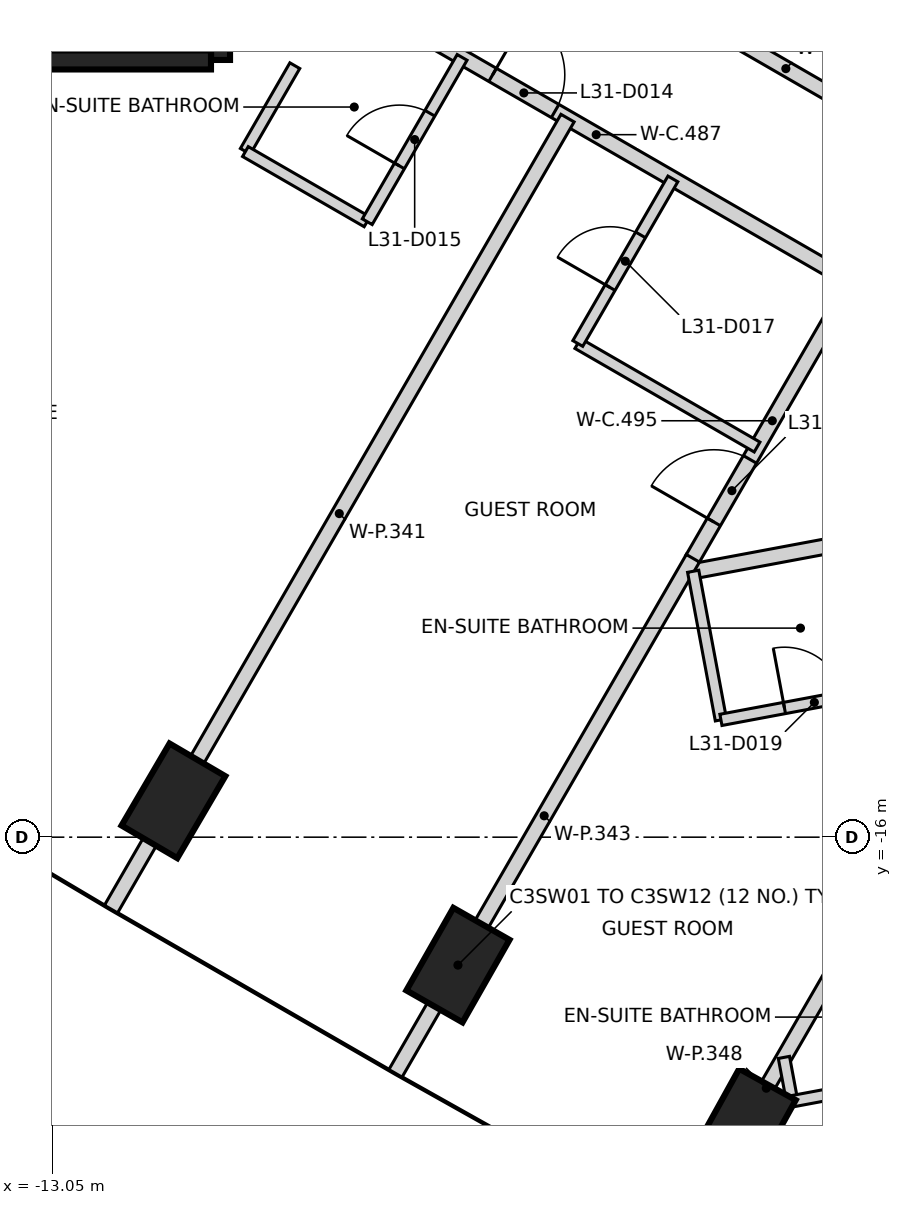
"""IFC4 building model, lengths in metres.
Left out: names, types, materials, properties, quantities, classifications, styles, units other than length and angle.
Written with IfcOpenShell. Run it as: python <this file> out.ifc"""

import sys

from ifc_helpers import new_model, si_unit, direction, frame, frame_2d, origin, origin_2d, place, context, subcontext, project, spatial, rectangle, extrude, element, fill, save


model = new_model("IFC4")
c1 = context("Model", 3, precision=1e-05, world=origin(), true_north=direction((0.0, 1.0)))
c2 = subcontext(c1, "Body", "Model", "MODEL_VIEW")
j1 = project(units=[si_unit("LENGTHUNIT", "METRE"), si_unit("PLANEANGLEUNIT", "RADIAN")], contexts=[c1])
p1 = place(None, origin())
s1 = spatial("IfcSite", under=j1, at=p1, CompositionType="ELEMENT")
p2 = place(p1, origin())
s2 = spatial("IfcBuilding", under=s1, at=p2, CompositionType="ELEMENT")
p3 = place(p2, frame((0.0, 0.0, 128.8)))
s3 = spatial("IfcBuildingStorey", under=s2, at=p3, CompositionType="ELEMENT", Elevation=128.8)
for number, where, z_axis, x_axis in (
    (1, (-11.457, -15.522, -0.4), (0.0, 0.0, 1.0), (0.505, 0.863, 0.0)),
    (2, (-7.714, -17.683, -0.4), (0.0, 0.0, 1.0), (0.495, 0.869, 0.0)),
    (3, (-3.945, -19.8, -0.4), (0.0, 0.0, 1.0), (0.485, 0.875, 0.0)),
):
    element("IfcColumn", number, at=place(p3, frame(where, z_axis=z_axis, x_axis=x_axis)), inside=s3, PredefinedType="COLUMN", context=c2, shape_type="SweptSolid", body=[
        extrude(rectangle(XDim=1.25, YDim=0.85, at=origin_2d()), origin(), (0.0, 0.0, 1.0), 3.6),
    ])
p4 = place(p3, frame((-10.837, 5.775, 0.0), z_axis=(0.0, 0.0, 1.0), x_axis=(0.0, -1.0, 0.0)))
e4 = element("IfcWall", 4, at=p4, inside=s3, PredefinedType="SHEAR", context=c2, shape_type="SweptSolid", body=[
    extrude(rectangle(XDim=11.55, YDim=0.25, at=frame_2d((5.775, 0.0))), origin(), (0.0, 0.0, 1.0), 3.2),
])
p5 = place(p4, frame((10.025, 0.0, 0.0)))
e5 = element("IfcOpeningElement", 5, at=p5, cuts=e4, PredefinedType="OPENING", context=c2, shape_type="SweptSolid", body=[
    extrude(rectangle(XDim=1.2, YDim=2.1, at=frame_2d((0.6, 1.05))), frame((0.0, 0.135, 0.0), z_axis=(0.0, -1.0, 0.0), x_axis=(1.0, 0.0, 0.0)), (0.0, 0.0, 1.0), 0.27),
])
p6 = place(p4, frame((8.725, 0.0, 0.0)))
e6 = element("IfcOpeningElement", 6, at=p6, cuts=e4, PredefinedType="OPENING", context=c2, shape_type="SweptSolid", body=[
    extrude(rectangle(XDim=1.2, YDim=2.1, at=frame_2d((0.6, 1.05))), frame((0.0, 0.135, 0.0), z_axis=(0.0, -1.0, 0.0), x_axis=(1.0, 0.0, 0.0)), (0.0, 0.0, 1.0), 0.27),
])
p7 = place(p3, frame((-10.963, -5.775, 0.0), z_axis=(0.0, 0.0, 1.0), x_axis=(-1.0, 0.0, 0.0)))
e7 = element("IfcWall", 7, at=p7, inside=s3, PredefinedType="SHEAR", context=c2, shape_type="SweptSolid", body=[
    extrude(rectangle(XDim=5.225, YDim=0.25, at=frame_2d((2.612, 0.0))), origin(), (0.0, 0.0, 1.0), 3.2),
])
p8 = place(p3, frame((-9.262, -4.814, 0.0), z_axis=(0.0, 0.0, 1.0), x_axis=(0.866109782156, -0.499853823887, 0.0)))
e8 = element("IfcWall", 8, at=p8, inside=s3, PredefinedType="PARTITIONING", context=c2, shape_type="SweptSolid", body=[
    extrude(rectangle(XDim=7.776, YDim=0.2, at=frame_2d((3.888, 0.0))), origin(), (0.0, 0.0, 1.0), 3.2),
])
p9 = place(p8, frame((2.314, 0.0, 0.0)))
e9 = element("IfcOpeningElement", 9, at=p9, cuts=e8, PredefinedType="OPENING", context=c2, shape_type="SweptSolid", body=[
    extrude(rectangle(XDim=0.95, YDim=2.1, at=frame_2d((0.475, 1.05))), frame((0.0, 0.11, 0.0), z_axis=(0.0, -1.0, 0.0), x_axis=(1.0, 0.0, 0.0)), (0.0, 0.0, 1.0), 0.22),
])
p10 = place(p3, frame((-8.612, -2.88, 0.0), z_axis=(0.0, 0.0, 1.0), x_axis=(0.866035279512, -0.499982894348, 0.0)))
e10 = element("IfcWall", 10, at=p10, inside=s3, PredefinedType="PARTITIONING", context=c2, shape_type="SweptSolid", body=[
    extrude(rectangle(XDim=12.037, YDim=0.2, at=frame_2d((6.018, 0.0))), origin(), (0.0, 0.0, 1.0), 3.2),
])
p11 = place(p10, frame((1.484, 0.0, 0.0)))
e11 = element("IfcOpeningElement", 11, at=p11, cuts=e10, PredefinedType="OPENING", context=c2, shape_type="SweptSolid", body=[
    extrude(rectangle(XDim=0.9, YDim=2.1, at=frame_2d((0.45, 1.05))), frame((0.0, 0.11, 0.0), z_axis=(0.0, -1.0, 0.0), x_axis=(1.0, 0.0, 0.0)), (0.0, 0.0, 1.0), 0.22),
])
p12 = place(p10, frame((7.491, 0.0, 0.0)))
e12 = element("IfcOpeningElement", 12, at=p12, cuts=e10, PredefinedType="OPENING", context=c2, shape_type="SweptSolid", body=[
    extrude(rectangle(XDim=0.9, YDim=2.1, at=frame_2d((0.45, 1.05))), frame((0.0, 0.11, 0.0), z_axis=(0.0, -1.0, 0.0), x_axis=(1.0, 0.0, 0.0)), (0.0, 0.0, 1.0), 0.22),
])
p13 = place(p3, frame((-4.629, -12.341, 0.0), z_axis=(0.0, 0.0, 1.0), x_axis=(0.500069467685, 0.865985292883, 0.0)))
e13 = element("IfcWall", 13, at=p13, inside=s3, PredefinedType="PARTITIONING", context=c2, shape_type="SweptSolid", body=[
    extrude(rectangle(XDim=4.202, YDim=0.2, at=frame_2d((2.101, 0.0))), origin(), (0.0, 0.0, 1.0), 3.2),
])
p14 = place(p13, frame((0.564, 0.0, 0.0)))
e14 = element("IfcOpeningElement", 14, at=p14, cuts=e13, PredefinedType="OPENING", context=c2, shape_type="SweptSolid", body=[
    extrude(rectangle(XDim=0.95, YDim=2.1, at=frame_2d((0.475, 1.05))), frame((0.0, 0.11, 0.0), z_axis=(0.0, -1.0, 0.0), x_axis=(1.0, 0.0, 0.0)), (0.0, 0.0, 1.0), 0.22),
])
p15 = place(p3, frame((-4.6, -12.498, 0.0), z_axis=(0.0, 0.0, 1.0), x_axis=(0.982950102255, 0.183872500602, 0.0)))
e15 = element("IfcWall", 15, at=p15, inside=s3, PredefinedType="PARTITIONING", context=c2, shape_type="SweptSolid", body=[
    extrude(rectangle(XDim=2.48, YDim=0.2, at=frame_2d((1.24, 0.0))), origin(), (0.0, 0.0, 1.0), 3.2),
])
p16 = place(p3, frame((-12.278, -16.946, 0.0), z_axis=(0.0, 0.0, 1.0), x_axis=(0.499887212932, 0.866090511637, 0.0)))
e16 = element("IfcWall", 16, at=p16, inside=s3, PredefinedType="PARTITIONING", context=c2, shape_type="SweptSolid", body=[
    extrude(rectangle(XDim=12.015, YDim=0.2, at=frame_2d((6.007, 0.0))), origin(), (0.0, 0.0, 1.0), 3.2),
])
p17 = place(p3, frame((-8.535, -19.107, 0.0), z_axis=(0.0, 0.0, 1.0), x_axis=(0.500028565219, 0.866008911019, 0.0)))
e17 = element("IfcWall", 17, at=p17, inside=s3, PredefinedType="PARTITIONING", context=c2, shape_type="SweptSolid", body=[
    extrude(rectangle(XDim=7.824, YDim=0.2, at=frame_2d((3.912, 0.0))), origin(), (0.0, 0.0, 1.0), 3.2),
])
p18 = place(p3, frame((-8.0, -0.924, 0.0), z_axis=(0.0, 0.0, 1.0), x_axis=(0.86604129137, -0.499972480886, 0.0)))
e18 = element("IfcWall", 18, at=p18, inside=s3, PredefinedType="PARTITIONING", context=c2, shape_type="SweptSolid", body=[
    extrude(rectangle(XDim=12.932, YDim=0.2, at=frame_2d((6.466, 0.0))), origin(), (0.0, 0.0, 1.0), 2.3),
])
p19 = place(p3, frame((-4.767, -21.223, 0.0), z_axis=(0.0, 0.0, 1.0), x_axis=(0.500305100915, 0.865849182017, 0.0)))
e19 = element("IfcWall", 19, at=p19, inside=s3, PredefinedType="PARTITIONING", context=c2, shape_type="SweptSolid", body=[
    extrude(rectangle(XDim=4.437, YDim=0.2, at=frame_2d((2.218, 0.0))), origin(), (0.0, 0.0, 1.0), 3.2),
])
p20 = place(p3, frame((-10.511, -6.977, 0.0), z_axis=(0.0, 0.0, 1.0), x_axis=(0.500274472704, 0.865866878891, 0.0)))
e20 = element("IfcWall", 20, at=p20, inside=s3, PredefinedType="PARTITIONING", context=c2, shape_type="SweptSolid", body=[
    extrude(rectangle(XDim=1.302, YDim=0.15, at=frame_2d((0.651, 0.0))), origin(), (0.0, 0.0, 1.0), 3.2),
])
p21 = place(p3, frame((-10.51, -6.98, 0.0), z_axis=(0.0, 0.0, 1.0), x_axis=(0.865965533559, -0.500103683937, 0.0)))
e21 = element("IfcWall", 21, at=p21, inside=s3, PredefinedType="PARTITIONING", context=c2, shape_type="SweptSolid", body=[
    extrude(rectangle(XDim=1.848, YDim=0.15, at=frame_2d((0.924, 0.0))), origin(), (0.0, 0.0, 1.0), 3.2),
])
p22 = place(p3, frame((-8.907, -7.903, 0.0), z_axis=(0.0, 0.0, 1.0), x_axis=(0.499925626596, 0.866068339032, 0.0)))
e22 = element("IfcWall", 22, at=p22, inside=s3, PredefinedType="PARTITIONING", context=c2, shape_type="SweptSolid", body=[
    extrude(rectangle(XDim=2.497, YDim=0.15, at=frame_2d((1.248, 0.0))), origin(), (0.0, 0.0, 1.0), 3.2),
])
p23 = place(p22, frame((0.848, 0.0, 0.0)))
e23 = element("IfcOpeningElement", 23, at=p23, cuts=e22, PredefinedType="OPENING", context=c2, shape_type="SweptSolid", body=[
    extrude(rectangle(XDim=0.8, YDim=2.1, at=frame_2d((0.4, 1.05))), frame((0.0, 0.085, 0.0), z_axis=(0.0, -1.0, 0.0), x_axis=(1.0, 0.0, 0.0)), (0.0, 0.0, 1.0), 0.17),
])
p24 = place(p3, frame((-6.137, -9.505, 0.0), z_axis=(0.0, 0.0, 1.0), x_axis=(0.866000497904, -0.50004313577, 0.0)))
e24 = element("IfcWall", 24, at=p24, inside=s3, PredefinedType="PARTITIONING", context=c2, shape_type="SweptSolid", body=[
    extrude(rectangle(XDim=2.724, YDim=0.15, at=frame_2d((1.362, 0.0))), origin(), (0.0, 0.0, 1.0), 3.2),
])
p25 = place(p3, frame((-6.137, -9.505, 0.0), z_axis=(0.0, 0.0, 1.0), x_axis=(0.500339416332, 0.86582935297, 0.0)))
e25 = element("IfcWall", 25, at=p25, inside=s3, PredefinedType="PARTITIONING", context=c2, shape_type="SweptSolid", body=[
    extrude(rectangle(XDim=2.5, YDim=0.15, at=frame_2d((1.25, 0.0))), origin(), (0.0, 0.0, 1.0), 3.2),
])
p26 = place(p25, frame((0.85, 0.0, 0.0)))
e26 = element("IfcOpeningElement", 26, at=p26, cuts=e25, PredefinedType="OPENING", context=c2, shape_type="SweptSolid", body=[
    extrude(rectangle(XDim=0.8, YDim=2.1, at=frame_2d((0.4, 1.05))), frame((0.0, 0.085, 0.0), z_axis=(0.0, -1.0, 0.0), x_axis=(1.0, 0.0, 0.0)), (0.0, 0.0, 1.0), 0.17),
])
p27 = place(p3, frame((-4.619, -12.502, 0.0), z_axis=(0.0, 0.0, 1.0), x_axis=(0.183517674038, -0.983016410502, 0.0)))
e27 = element("IfcWall", 27, at=p27, inside=s3, PredefinedType="PARTITIONING", context=c2, shape_type="SweptSolid", body=[
    extrude(rectangle(XDim=1.989, YDim=0.15, at=frame_2d((0.994, 0.0))), origin(), (0.0, 0.0, 1.0), 3.2),
])
p28 = place(p3, frame((-4.254, -14.457, 0.0), z_axis=(0.0, 0.0, 1.0), x_axis=(0.98293843799, 0.183934844773, 0.0)))
e28 = element("IfcWall", 28, at=p28, inside=s3, PredefinedType="PARTITIONING", context=c2, shape_type="SweptSolid", body=[
    extrude(rectangle(XDim=2.501, YDim=0.15, at=frame_2d((1.25, 0.0))), origin(), (0.0, 0.0, 1.0), 3.2),
])
p29 = place(p28, frame((0.85, 0.0, 0.0)))
e29 = element("IfcOpeningElement", 29, at=p29, cuts=e28, PredefinedType="OPENING", context=c2, shape_type="SweptSolid", body=[
    extrude(rectangle(XDim=0.8, YDim=2.1, at=frame_2d((0.4, 1.05))), frame((0.0, 0.085, 0.0), z_axis=(0.0, -1.0, 0.0), x_axis=(1.0, 0.0, 0.0)), (0.0, 0.0, 1.0), 0.17),
])
p30 = place(p3, frame((-3.425, -18.897, 0.0), z_axis=(0.0, 0.0, 1.0), x_axis=(0.183861553242, -0.982952150025, 0.0)))
e30 = element("IfcWall", 30, at=p30, inside=s3, PredefinedType="PARTITIONING", context=c2, shape_type="SweptSolid", body=[
    extrude(rectangle(XDim=0.587, YDim=0.15, at=frame_2d((0.293, 0.0))), origin(), (0.0, 0.0, 1.0), 3.2),
])
p31 = place(p3, frame((-3.315, -19.474, 0.0), z_axis=(0.0, 0.0, 1.0), x_axis=(0.982978173855, 0.183722371326, 0.0)))
e31 = element("IfcWall", 31, at=p31, inside=s3, PredefinedType="PARTITIONING", context=c2, shape_type="SweptSolid", body=[
    extrude(rectangle(XDim=2.5, YDim=0.15, at=frame_2d((1.25, 0.0))), origin(), (0.0, 0.0, 1.0), 3.2),
])
p32 = place(p31, frame((0.915, 0.0, 0.0)))
e32 = element("IfcOpeningElement", 32, at=p32, cuts=e31, PredefinedType="OPENING", context=c2, shape_type="SweptSolid", body=[
    extrude(rectangle(XDim=0.8, YDim=2.1, at=frame_2d((0.4, 1.05))), frame((0.0, 0.085, 0.0), z_axis=(0.0, -1.0, 0.0), x_axis=(1.0, 0.0, 0.0)), (0.0, 0.0, 1.0), 0.17),
])
p33 = place(p9, frame((0.95, 0.0, 0.0), z_axis=(0.0, 0.0, 1.0), x_axis=(-1.0, 0.0, 0.0)))
e33 = element("IfcDoor", 33, at=p33, inside=s3, OperationType="SINGLE_SWING_LEFT", PredefinedType="DOOR", context=c2, shape_type="SweptSolid", body=[
    extrude(rectangle(XDim=0.95, YDim=2.1, at=frame_2d((0.475, 1.05))), frame((0.0, 0.025, 0.0), z_axis=(0.0, -1.0, 0.0), x_axis=(1.0, 0.0, 0.0)), (0.0, 0.0, 1.0), 0.05),
])
fill(e9, e33)
p34 = place(p23, origin())
e34 = element("IfcDoor", 34, at=p34, inside=s3, OperationType="SINGLE_SWING_LEFT", PredefinedType="DOOR", context=c2, shape_type="SweptSolid", body=[
    extrude(rectangle(XDim=0.8, YDim=2.1, at=frame_2d((0.4, 1.05))), frame((0.0, 0.025, 0.0), z_axis=(0.0, -1.0, 0.0), x_axis=(1.0, 0.0, 0.0)), (0.0, 0.0, 1.0), 0.05),
])
fill(e23, e34)
p35 = place(p14, origin())
e35 = element("IfcDoor", 35, at=p35, inside=s3, OperationType="SINGLE_SWING_LEFT", PredefinedType="DOOR", context=c2, shape_type="SweptSolid", body=[
    extrude(rectangle(XDim=0.95, YDim=2.1, at=frame_2d((0.475, 1.05))), frame((0.0, 0.025, 0.0), z_axis=(0.0, -1.0, 0.0), x_axis=(1.0, 0.0, 0.0)), (0.0, 0.0, 1.0), 0.05),
])
fill(e14, e35)
p36 = place(p26, frame((0.8, 0.0, 0.0), z_axis=(0.0, 0.0, 1.0), x_axis=(-1.0, 0.0, 0.0)))
e36 = element("IfcDoor", 36, at=p36, inside=s3, OperationType="SINGLE_SWING_LEFT", PredefinedType="DOOR", context=c2, shape_type="SweptSolid", body=[
    extrude(rectangle(XDim=0.8, YDim=2.1, at=frame_2d((0.4, 1.05))), frame((0.0, 0.025, 0.0), z_axis=(0.0, -1.0, 0.0), x_axis=(1.0, 0.0, 0.0)), (0.0, 0.0, 1.0), 0.05),
])
fill(e26, e36)
p37 = place(p29, frame((0.8, 0.0, 0.0), z_axis=(0.0, 0.0, 1.0), x_axis=(-1.0, 0.0, 0.0)))
e37 = element("IfcDoor", 37, at=p37, inside=s3, OperationType="SINGLE_SWING_LEFT", PredefinedType="DOOR", context=c2, shape_type="SweptSolid", body=[
    extrude(rectangle(XDim=0.8, YDim=2.1, at=frame_2d((0.4, 1.05))), frame((0.0, 0.025, 0.0), z_axis=(0.0, -1.0, 0.0), x_axis=(1.0, 0.0, 0.0)), (0.0, 0.0, 1.0), 0.05),
])
fill(e29, e37)
save(model, sys.argv[1])
